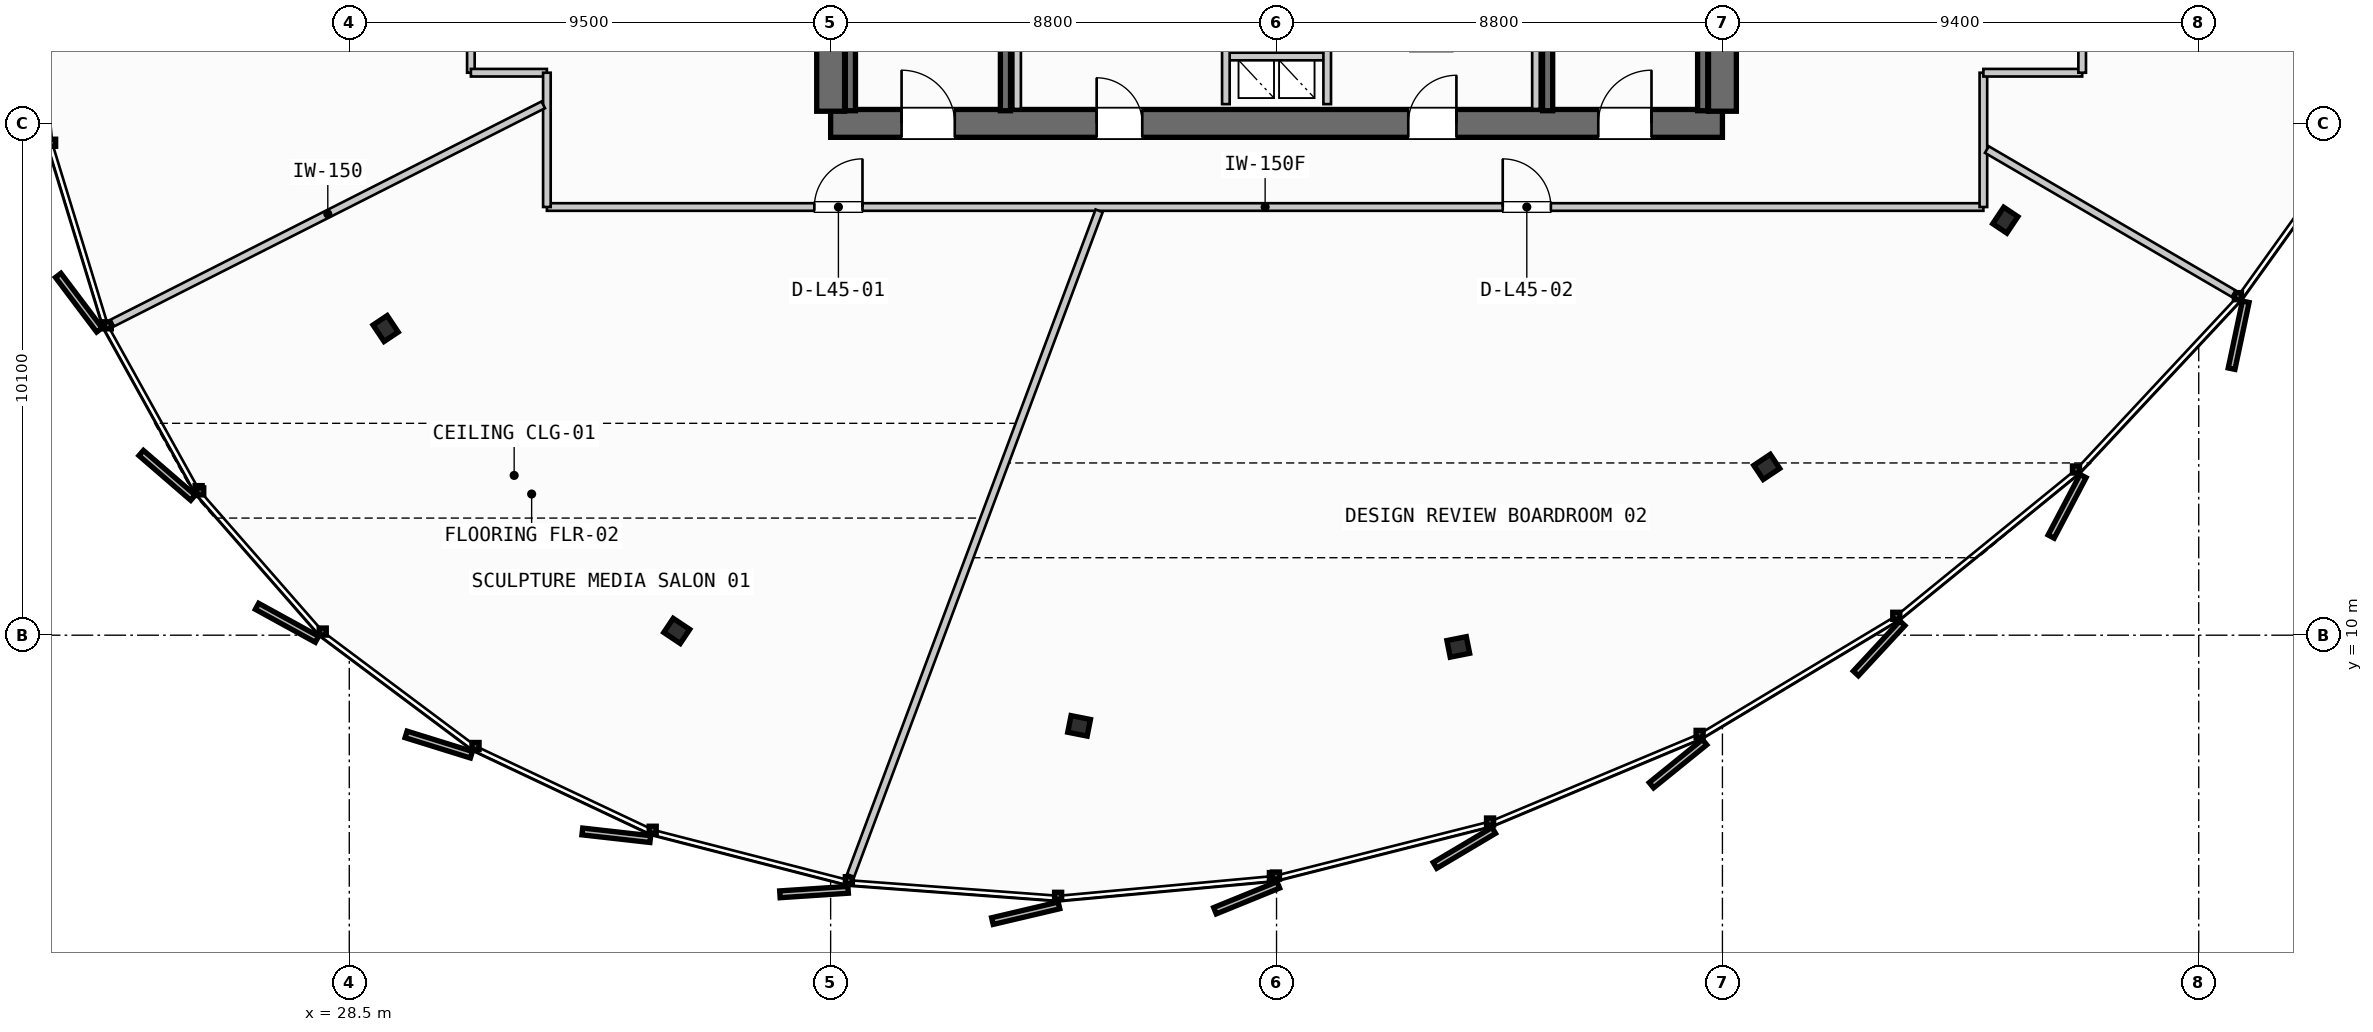
"""IFC4 building model, lengths in metres.
Left out: names, types, materials, properties, quantities, classifications, styles, units other than length and angle.
Written with IfcOpenShell. Run it as: python <this file> out.ifc"""

import sys

from ifc_helpers import new_model, si_unit, direction, frame, frame_2d, origin, origin_2d, place, context, subcontext, project, spatial, rectangle, i_section, extrude, source, transform, mapped, element, fill, save


model = new_model("IFC4")
c1 = context("Model", 3, precision=1e-05, world=origin(), true_north=direction((0.0, 1.0)))
c2 = subcontext(c1, "Body", "Model", "MODEL_VIEW")
j1 = project(units=[si_unit("LENGTHUNIT", "METRE"), si_unit("PLANEANGLEUNIT", "RADIAN")], contexts=[c1])
p1 = place(None, origin())
s1 = spatial("IfcSite", under=j1, at=p1, CompositionType="ELEMENT")
p2 = place(p1, origin())
s2 = spatial("IfcBuilding", under=s1, at=p2, CompositionType="ELEMENT")
p3 = place(p2, frame((0.0, 0.0, 176.4)))
s3 = spatial("IfcBuildingStorey", under=s2, at=p3, CompositionType="ELEMENT", Elevation=176.4)
p4 = place(p3, frame((38.0, 20.1, 0.0), z_axis=(0.0, 0.0, 1.0), x_axis=(1.0, 0.0, 0.0)))
e1 = element("IfcWall", 1, at=p4, inside=s3, PredefinedType="SHEAR", context=c2, shape_type="SweptSolid", body=[
    extrude(rectangle(XDim=17.6, YDim=0.55, at=frame_2d((8.8, 0.0))), origin(), (0.0, 0.0, 1.0), 3.26),
])
p5 = place(p4, frame((1.4, 0.0, 0.0)))
e2 = element("IfcOpeningElement", 2, at=p5, cuts=e1, PredefinedType="OPENING", context=c2, shape_type="SweptSolid", body=[
    extrude(rectangle(XDim=1.05, YDim=2.15, at=frame_2d((0.525, 1.075))), frame((0.0, 0.285, 0.0), z_axis=(0.0, -1.0, 0.0), x_axis=(1.0, 0.0, 0.0)), (0.0, 0.0, 1.0), 0.57),
])
p6 = place(p4, frame((15.15, 0.0, 0.0)))
e3 = element("IfcOpeningElement", 3, at=p6, cuts=e1, PredefinedType="OPENING", context=c2, shape_type="SweptSolid", body=[
    extrude(rectangle(XDim=1.05, YDim=2.15, at=frame_2d((0.525, 1.075))), frame((0.0, 0.285, 0.0), z_axis=(0.0, -1.0, 0.0), x_axis=(1.0, 0.0, 0.0)), (0.0, 0.0, 1.0), 0.57),
])
p7 = place(p4, frame((5.25, 0.0, 0.0)))
e4 = element("IfcOpeningElement", 4, at=p7, cuts=e1, PredefinedType="OPENING", context=c2, shape_type="SweptSolid", body=[
    extrude(rectangle(XDim=0.9, YDim=2.15, at=frame_2d((0.45, 1.075))), frame((0.0, 0.285, 0.0), z_axis=(0.0, -1.0, 0.0), x_axis=(1.0, 0.0, 0.0)), (0.0, 0.0, 1.0), 0.57),
])
p8 = place(p4, frame((11.4, 0.0, 0.0)))
e5 = element("IfcOpeningElement", 5, at=p8, cuts=e1, PredefinedType="OPENING", context=c2, shape_type="SweptSolid", body=[
    extrude(rectangle(XDim=0.95, YDim=2.15, at=frame_2d((0.475, 1.075))), frame((0.0, 0.285, 0.0), z_axis=(0.0, -1.0, 0.0), x_axis=(1.0, 0.0, 0.0)), (0.0, 0.0, 1.0), 0.57),
])
p9 = place(p3, frame((38.0, 35.26, 0.0), z_axis=(0.0, 0.0, 1.0), x_axis=(0.0, -1.0, 0.0)))
e6 = element("IfcWall", 6, at=p9, inside=s3, PredefinedType="SHEAR", context=c2, shape_type="SweptSolid", body=[
    extrude(rectangle(XDim=14.92, YDim=0.55, at=frame_2d((7.46, 0.0))), origin(), (0.0, 0.0, 1.0), 3.26),
])
p10 = place(p9, frame((5.21, 0.0, 0.0)))
e7 = element("IfcOpeningElement", 7, at=p10, cuts=e6, PredefinedType="OPENING", context=c2, shape_type="SweptSolid", body=[
    extrude(rectangle(XDim=1.1, YDim=2.2, at=frame_2d((0.55, 1.1))), frame((0.0, 0.285, 0.0), z_axis=(0.0, -1.0, 0.0), x_axis=(1.0, 0.0, 0.0)), (0.0, 0.0, 1.0), 0.57),
])
p11 = place(p3, frame((55.6, 20.34, 0.0), z_axis=(0.0, 0.0, 1.0), x_axis=(0.0, 1.0, 0.0)))
e8 = element("IfcWall", 8, at=p11, inside=s3, PredefinedType="SHEAR", context=c2, shape_type="SweptSolid", body=[
    extrude(rectangle(XDim=14.92, YDim=0.55, at=frame_2d((7.46, 0.0))), origin(), (0.0, 0.0, 1.0), 3.26),
])
p12 = place(p11, frame((12.71, 0.0, 0.0)))
e9 = element("IfcOpeningElement", 9, at=p12, cuts=e8, PredefinedType="OPENING", context=c2, shape_type="SweptSolid", body=[
    extrude(rectangle(XDim=1.05, YDim=2.15, at=frame_2d((0.525, 1.075))), frame((0.0, 0.285, 0.0), z_axis=(0.0, -1.0, 0.0), x_axis=(1.0, 0.0, 0.0)), (0.0, 0.0, 1.0), 0.57),
])
p13 = place(p11, frame((8.61, 0.0, 0.0)))
e10 = element("IfcOpeningElement", 10, at=p13, cuts=e8, PredefinedType="OPENING", context=c2, shape_type="SweptSolid", body=[
    extrude(rectangle(XDim=1.1, YDim=2.2, at=frame_2d((0.55, 1.1))), frame((0.0, 0.285, 0.0), z_axis=(0.0, -1.0, 0.0), x_axis=(1.0, 0.0, 0.0)), (0.0, 0.0, 1.0), 0.57),
])
m1 = source(origin(), c2, "Body", "SweptSolid", [
    extrude(i_section(OverallWidth=0.391, OverallDepth=0.335, WebThickness=0.023, FlangeThickness=0.034, FilletRadius=0.015, at=origin_2d()), origin(), (0.0, 0.0, 1.0), 3.26),
])
for number, where, z_axis, x_axis in (
    (11, (29.218, 16.052, 0.0), (0.0, 0.0, 1.0), (-0.831, -0.556, 0.0)),
    (12, (34.963, 10.084, 0.0), (0.0, 0.0, 1.0), (-0.556, -0.831, 0.0)),
    (13, (42.904, 8.211, 0.0), (0.0, 0.0, 1.0), (-0.195, -0.981, 0.0)),
    (14, (50.387, 9.769, 0.0), (0.0, 0.0, 1.0), (0.195, -0.981, 0.0)),
    (15, (56.475, 13.321, 0.0), (0.0, 0.0, 1.0), (0.556, -0.831, 0.0)),
    (16, (61.183, 18.19, 0.0), (0.0, 0.0, 1.0), (0.831, -0.556, 0.0)),
):
    element("IfcColumn", number, at=place(p3, frame(where, z_axis=z_axis, x_axis=x_axis)), inside=s3, PredefinedType="COLUMN", context=c2, shape_type="MappedRepresentation", body=[
        mapped(m1, transform((0.0, 0.0, 0.0), scale=1.0)),
    ])
for number, where, z_axis, x_axis in (
    (17, (41.45, 27.7, 0.0), (0.0, 0.0, 1.0), (0.0, -1.0, 0.0)),
    (18, (38.39, 20.35, 0.0), (0.0, 0.0, 1.0), (0.0, 1.0, 0.0)),
    (19, (55.21, 27.7, 0.0), (0.0, 0.0, 1.0), (0.0, -1.0, 0.0)),
    (20, (52.15, 20.35, 0.0), (0.0, 0.0, 1.0), (0.0, 1.0, 0.0)),
):
    element("IfcWall", number, at=place(p3, frame(where, z_axis=z_axis, x_axis=x_axis)), inside=s3, PredefinedType="SHEAR", context=c2, shape_type="SweptSolid", body=[
        extrude(rectangle(XDim=7.35, YDim=0.2, at=frame_2d((3.675, 0.0))), origin(), (0.0, 0.0, 1.0), 3.26),
    ])
p14 = place(p3, frame((45.8, 21.42, 0.0), z_axis=(0.0, 0.0, 1.0), x_axis=(1.0, 0.0, 0.0)))
e21 = element("IfcWall", 21, at=p14, inside=s3, PredefinedType="PARTITIONING", context=c2, shape_type="SweptSolid", body=[
    extrude(rectangle(XDim=2.0, YDim=0.15, at=frame_2d((1.0, 0.0))), origin(), (0.0, 0.0, 1.0), 2.28),
])
for number, where, z_axis, x_axis in (
    (22, (45.8, 20.48, 0.0), (0.0, 0.0, 1.0), (0.0, 1.0, 0.0)),
    (23, (47.8, 20.48, 0.0), (0.0, 0.0, 1.0), (0.0, 1.0, 0.0)),
):
    element("IfcWall", number, at=place(p3, frame(where, z_axis=z_axis, x_axis=x_axis)), inside=s3, PredefinedType="PARTITIONING", context=c2, shape_type="SweptSolid", body=[
        extrude(rectangle(XDim=2.24, YDim=0.15, at=frame_2d((1.12, 0.0))), origin(), (0.0, 0.0, 1.0), 2.28),
    ])
for number, where, z_axis, x_axis in (
    (24, (41.68, 20.385, 0.0), (0.0, 0.0, 1.0), (0.0, 1.0, 0.0)),
    (25, (51.92, 20.385, 0.0), (0.0, 0.0, 1.0), (0.0, 1.0, 0.0)),
):
    element("IfcWall", number, at=place(p3, frame(where, z_axis=z_axis, x_axis=x_axis)), inside=s3, PredefinedType="PARTITIONING", context=c2, shape_type="SweptSolid", body=[
        extrude(rectangle(XDim=2.345, YDim=0.15, at=frame_2d((1.172, 0.0))), origin(), (0.0, 0.0, 1.0), 2.28),
    ])
p15 = place(p3, frame((32.4, 18.45, 0.0), z_axis=(0.0, 0.0, 1.0), x_axis=(1.0, 0.0, 0.0)))
e26 = element("IfcWall", 26, at=p15, inside=s3, PredefinedType="PARTITIONING", context=c2, shape_type="SweptSolid", body=[
    extrude(rectangle(XDim=28.35, YDim=0.15, at=frame_2d((14.175, 0.0))), origin(), (0.0, 0.0, 1.0), 2.28),
])
p16 = place(p15, frame((5.278, 0.0, 0.0)))
e27 = element("IfcOpeningElement", 27, at=p16, cuts=e26, PredefinedType="OPENING", context=c2, shape_type="SweptSolid", body=[
    extrude(rectangle(XDim=0.95, YDim=2.15, at=frame_2d((0.475, 1.075))), frame((0.0, 0.085, 0.0), z_axis=(0.0, -1.0, 0.0), x_axis=(1.0, 0.0, 0.0)), (0.0, 0.0, 1.0), 0.17),
])
p17 = place(p15, frame((18.864, 0.0, 0.0)))
e28 = element("IfcOpeningElement", 28, at=p17, cuts=e26, PredefinedType="OPENING", context=c2, shape_type="SweptSolid", body=[
    extrude(rectangle(XDim=0.95, YDim=2.15, at=frame_2d((0.475, 1.075))), frame((0.0, 0.085, 0.0), z_axis=(0.0, -1.0, 0.0), x_axis=(1.0, 0.0, 0.0)), (0.0, 0.0, 1.0), 0.17),
])
p18 = place(p3, frame((60.75, 18.45, 0.0), z_axis=(0.0, 0.0, 1.0), x_axis=(0.0, 1.0, 0.0)))
e29 = element("IfcWall", 29, at=p18, inside=s3, PredefinedType="PARTITIONING", context=c2, shape_type="SweptSolid", body=[
    extrude(rectangle(XDim=2.65, YDim=0.15, at=frame_2d((1.325, 0.0))), origin(), (0.0, 0.0, 1.0), 2.28),
])
p19 = place(p3, frame((60.75, 21.1, 0.0), z_axis=(0.0, 0.0, 1.0), x_axis=(1.0, 0.0, 0.0)))
e30 = element("IfcWall", 30, at=p19, inside=s3, PredefinedType="PARTITIONING", context=c2, shape_type="SweptSolid", body=[
    extrude(rectangle(XDim=1.95, YDim=0.15, at=frame_2d((0.975, 0.0))), origin(), (0.0, 0.0, 1.0), 2.28),
])
for number, where, z_axis, x_axis in (
    (31, (62.7, 21.1, 0.0), (0.0, 0.0, 1.0), (0.0, 1.0, 0.0)),
    (32, (30.9, 22.8, 0.0), (0.0, 0.0, 1.0), (0.0, -1.0, 0.0)),
):
    element("IfcWall", number, at=place(p3, frame(where, z_axis=z_axis, x_axis=x_axis)), inside=s3, PredefinedType="PARTITIONING", context=c2, shape_type="SweptSolid", body=[
        extrude(rectangle(XDim=1.7, YDim=0.15, at=frame_2d((0.85, 0.0))), origin(), (0.0, 0.0, 1.0), 2.28),
    ])
p20 = place(p3, frame((30.9, 21.1, 0.0), z_axis=(0.0, 0.0, 1.0), x_axis=(1.0, 0.0, 0.0)))
e33 = element("IfcWall", 33, at=p20, inside=s3, PredefinedType="PARTITIONING", context=c2, shape_type="SweptSolid", body=[
    extrude(rectangle(XDim=1.5, YDim=0.15, at=frame_2d((0.75, 0.0))), origin(), (0.0, 0.0, 1.0), 2.28),
])
p21 = place(p3, frame((32.4, 21.1, 0.0), z_axis=(0.0, 0.0, 1.0), x_axis=(0.0, -1.0, 0.0)))
e34 = element("IfcWall", 34, at=p21, inside=s3, PredefinedType="PARTITIONING", context=c2, shape_type="SweptSolid", body=[
    extrude(rectangle(XDim=2.65, YDim=0.15, at=frame_2d((1.325, 0.0))), origin(), (0.0, 0.0, 1.0), 2.28),
])
p22 = place(p3, frame((32.329, 20.466, 0.0), z_axis=(0.0, 0.0, 1.0), x_axis=(-0.8921776688, -0.451684632564, 0.0)))
e35 = element("IfcWall", 35, at=p22, inside=s3, PredefinedType="PARTITIONING", context=c2, shape_type="SweptSolid", body=[
    extrude(rectangle(XDim=9.533, YDim=0.15, at=frame_2d((4.767, 0.0))), origin(), (0.0, 0.0, 1.0), 2.28),
])
p23 = place(p3, frame((43.299, 18.375, 0.0), z_axis=(0.0, 0.0, 1.0), x_axis=(-0.350217655684, -0.936668347734, 0.0)))
e36 = element("IfcWall", 36, at=p23, inside=s3, PredefinedType="PARTITIONING", context=c2, shape_type="SweptSolid", body=[
    extrude(rectangle(XDim=14.004, YDim=0.15, at=frame_2d((7.002, 0.0))), origin(), (0.0, 0.0, 1.0), 2.28),
])
p24 = place(p3, frame((60.819, 19.583, 0.0), z_axis=(0.0, 0.0, 1.0), x_axis=(0.86359190548, -0.504191452515, 0.0)))
e37 = element("IfcWall", 37, at=p24, inside=s3, PredefinedType="PARTITIONING", context=c2, shape_type="SweptSolid", body=[
    extrude(rectangle(XDim=5.637, YDim=0.15, at=frame_2d((2.818, 0.0))), origin(), (0.0, 0.0, 1.0), 2.28),
])
m2 = source(origin(), c2, "Body", "SweptSolid", [
    extrude(rectangle(XDim=1.05, YDim=2.15, at=frame_2d((0.525, 1.075))), frame((0.0, 0.025, 0.0), z_axis=(0.0, -1.0, 0.0), x_axis=(1.0, 0.0, 0.0)), (0.0, 0.0, 1.0), 0.05),
])
p25 = place(p5, origin())
e38 = element("IfcDoor", 38, at=p25, inside=s3, OperationType="SINGLE_SWING_LEFT", PredefinedType="DOOR", context=c2, shape_type="MappedRepresentation", body=[
    mapped(m2, transform((0.0, 0.0, 0.0), scale=1.0)),
])
fill(e2, e38)
p26 = place(p6, origin())
e39 = element("IfcDoor", 39, at=p26, inside=s3, OperationType="SINGLE_SWING_RIGHT", PredefinedType="DOOR", context=c2, shape_type="MappedRepresentation", body=[
    mapped(m2, transform((0.0, 0.0, 0.0), scale=1.0)),
])
fill(e3, e39)
m3 = source(origin(), c2, "Body", "SweptSolid", [
    extrude(rectangle(XDim=0.9, YDim=2.15, at=frame_2d((0.45, 1.075))), frame((0.0, 0.025, 0.0), z_axis=(0.0, -1.0, 0.0), x_axis=(1.0, 0.0, 0.0)), (0.0, 0.0, 1.0), 0.05),
])
p27 = place(p7, origin())
e40 = element("IfcDoor", 40, at=p27, inside=s3, OperationType="SINGLE_SWING_LEFT", PredefinedType="DOOR", context=c2, shape_type="MappedRepresentation", body=[
    mapped(m3, transform((0.0, 0.0, 0.0), scale=1.0)),
])
fill(e4, e40)
m4 = source(origin(), c2, "Body", "SweptSolid", [
    extrude(rectangle(XDim=0.95, YDim=2.15, at=frame_2d((0.475, 1.075))), frame((0.0, 0.025, 0.0), z_axis=(0.0, -1.0, 0.0), x_axis=(1.0, 0.0, 0.0)), (0.0, 0.0, 1.0), 0.05),
])
p28 = place(p8, origin())
e41 = element("IfcDoor", 41, at=p28, inside=s3, OperationType="SINGLE_SWING_RIGHT", PredefinedType="DOOR", context=c2, shape_type="MappedRepresentation", body=[
    mapped(m4, transform((0.0, 0.0, 0.0), scale=1.0)),
])
fill(e5, e41)
p29 = place(p16, origin())
e42 = element("IfcDoor", 42, at=p29, inside=s3, OperationType="SINGLE_SWING_RIGHT", PredefinedType="DOOR", context=c2, shape_type="MappedRepresentation", body=[
    mapped(m4, transform((0.0, 0.0, 0.0), scale=1.0)),
])
fill(e27, e42)
p30 = place(p17, origin())
e43 = element("IfcDoor", 43, at=p30, inside=s3, OperationType="SINGLE_SWING_LEFT", PredefinedType="DOOR", context=c2, shape_type="MappedRepresentation", body=[
    mapped(m4, transform((0.0, 0.0, 0.0), scale=1.0)),
])
fill(e28, e43)
save(model, sys.argv[1])
